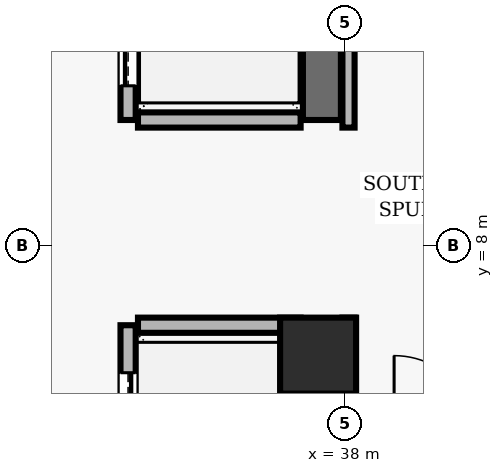
"""IFC4 building model, lengths in metres.
Left out: names, types, materials, properties, quantities, classifications, styles, units other than length and angle.
Written with IfcOpenShell. Run it as: python <this file> out.ifc"""

import sys

from ifc_helpers import new_model, si_unit, direction, frame, frame_2d, origin, origin_2d, place, context, subcontext, project, spatial, rectangle, extrude, element, fill, save


model = new_model("IFC4")
c1 = context("Model", 3, precision=1e-05, world=origin(), true_north=direction((0.0, 1.0)))
c2 = subcontext(c1, "Body", "Model", "MODEL_VIEW")
j1 = project(units=[si_unit("LENGTHUNIT", "METRE"), si_unit("PLANEANGLEUNIT", "RADIAN")], contexts=[c1])
p1 = place(None, origin())
s1 = spatial("IfcSite", under=j1, at=p1, CompositionType="ELEMENT")
p2 = place(p1, origin())
s2 = spatial("IfcBuilding", under=s1, at=p2, CompositionType="ELEMENT")
p3 = place(p2, frame((0.0, 0.0, 210.9)))
s3 = spatial("IfcBuildingStorey", under=s2, at=p3, CompositionType="ELEMENT", Elevation=210.9)
p4 = place(p3, frame((37.65, 6.55, 0.0), z_axis=(0.0, 0.0, 1.0), x_axis=(1.0, 0.0, 0.0)))
e1 = element("IfcColumn", 1, at=p4, inside=s3, PredefinedType="COLUMN", context=c2, shape_type="SweptSolid", body=[
    extrude(rectangle(XDim=1.0, YDim=1.0, at=origin_2d()), origin(), (0.0, 0.0, 1.0), 3.9),
])
p5 = place(p3, frame((35.15, 6.95, 0.0), z_axis=(0.0, 0.0, 1.0), x_axis=(0.0, -1.0, 0.0)))
e2 = element("IfcWall", 2, at=p5, inside=s3, PredefinedType="SOLIDWALL", context=c2, shape_type="SweptSolid", body=[
    extrude(rectangle(XDim=2.25, YDim=0.2, at=frame_2d((1.125, 0.0))), origin(), (0.0, 0.0, 1.0), 3.69),
])
p6 = place(p5, frame((0.625, 0.0, 0.0)))
e3 = element("IfcOpeningElement", 3, at=p6, cuts=e2, PredefinedType="OPENING", context=c2, shape_type="SweptSolid", body=[
    extrude(rectangle(XDim=1.0, YDim=2.1, at=frame_2d((0.5, 1.05))), frame((0.0, 0.11, 0.0), z_axis=(0.0, -1.0, 0.0), x_axis=(1.0, 0.0, 0.0)), (0.0, 0.0, 1.0), 0.22),
])
p7 = place(p3, frame((37.7, 4.7, 0.0), z_axis=(0.0, 0.0, 1.0), x_axis=(0.0, 1.0, 0.0)))
e4 = element("IfcWall", 4, at=p7, inside=s3, PredefinedType="SHEAR", context=c2, shape_type="SweptSolid", body=[
    extrude(rectangle(XDim=2.25, YDim=0.5, at=frame_2d((1.125, 0.0))), origin(), (0.0, 0.0, 1.0), 3.69),
])
p8 = place(p3, frame((37.42, 6.95, 0.0), z_axis=(0.0, 0.0, 1.0), x_axis=(-1.0, 0.0, 0.0)))
e5 = element("IfcWall", 5, at=p8, inside=s3, PredefinedType="SOLIDWALL", context=c2, shape_type="SweptSolid", body=[
    extrude(rectangle(XDim=2.14, YDim=0.2, at=frame_2d((1.07, 0.0))), origin(), (0.0, 0.0, 1.0), 3.69),
])
p9 = place(p3, frame((35.15, 11.55, 0.0), z_axis=(0.0, 0.0, 1.0), x_axis=(0.0, -1.0, 0.0)))
e6 = element("IfcWall", 6, at=p9, inside=s3, PredefinedType="SOLIDWALL", context=c2, shape_type="SweptSolid", body=[
    extrude(rectangle(XDim=1.9, YDim=0.2, at=frame_2d((0.95, 0.0))), origin(), (0.0, 0.0, 1.0), 3.69),
])
p10 = place(p9, frame((0.45, 0.0, 0.0)))
e7 = element("IfcOpeningElement", 7, at=p10, cuts=e6, PredefinedType="OPENING", context=c2, shape_type="SweptSolid", body=[
    extrude(rectangle(XDim=1.0, YDim=2.1, at=frame_2d((0.5, 1.05))), frame((0.0, 0.11, 0.0), z_axis=(0.0, -1.0, 0.0), x_axis=(1.0, 0.0, 0.0)), (0.0, 0.0, 1.0), 0.22),
])
p11 = place(p3, frame((37.7, 9.65, 0.0), z_axis=(0.0, 0.0, 1.0), x_axis=(0.0, 1.0, 0.0)))
e8 = element("IfcWall", 8, at=p11, inside=s3, PredefinedType="SHEAR", context=c2, shape_type="SweptSolid", body=[
    extrude(rectangle(XDim=1.9, YDim=0.5, at=frame_2d((0.95, 0.0))), origin(), (0.0, 0.0, 1.0), 3.69),
])
p12 = place(p3, frame((35.28, 9.65, 0.0), z_axis=(0.0, 0.0, 1.0), x_axis=(1.0, 0.0, 0.0)))
e9 = element("IfcWall", 9, at=p12, inside=s3, PredefinedType="SOLIDWALL", context=c2, shape_type="SweptSolid", body=[
    extrude(rectangle(XDim=2.14, YDim=0.2, at=frame_2d((1.07, 0.0))), origin(), (0.0, 0.0, 1.0), 3.69),
])
p13 = place(p3, frame((38.05, 7.05, 0.0), z_axis=(0.0, 0.0, 1.0), x_axis=(0.0, -1.0, 0.0)))
e10 = element("IfcWall", 10, at=p13, inside=s3, PredefinedType="PARTITIONING", context=c2, shape_type="SweptSolid", body=[
    extrude(rectangle(XDim=1.532, YDim=0.16, at=frame_2d((0.766, 0.0))), origin(), (0.0, 0.0, 1.0), 3.146),
])
p14 = place(p3, frame((38.05, 15.925, 0.0), z_axis=(0.0, 0.0, 1.0), x_axis=(0.0, -1.0, 0.0)))
e11 = element("IfcWall", 11, at=p14, inside=s3, PredefinedType="PARTITIONING", context=c2, shape_type="SweptSolid", body=[
    extrude(rectangle(XDim=6.375, YDim=0.16, at=frame_2d((3.188, 0.0))), origin(), (0.0, 0.0, 1.0), 3.146),
])
p15 = place(p6, origin())
e12 = element("IfcDoor", 12, at=p15, inside=s3, OperationType="DOUBLE_DOOR_SLIDING", PredefinedType="DOOR", context=c2, shape_type="SweptSolid", body=[
    extrude(rectangle(XDim=1.0, YDim=2.1, at=frame_2d((0.5, 1.05))), frame((0.0, 0.025, 0.0), z_axis=(0.0, -1.0, 0.0), x_axis=(1.0, 0.0, 0.0)), (0.0, 0.0, 1.0), 0.05),
])
fill(e3, e12)
p16 = place(p10, origin())
e13 = element("IfcDoor", 13, at=p16, inside=s3, OperationType="DOUBLE_DOOR_SLIDING", PredefinedType="DOOR", context=c2, shape_type="SweptSolid", body=[
    extrude(rectangle(XDim=1.0, YDim=2.1, at=frame_2d((0.5, 1.05))), frame((0.0, 0.025, 0.0), z_axis=(0.0, -1.0, 0.0), x_axis=(1.0, 0.0, 0.0)), (0.0, 0.0, 1.0), 0.05),
])
fill(e7, e13)
save(model, sys.argv[1])
